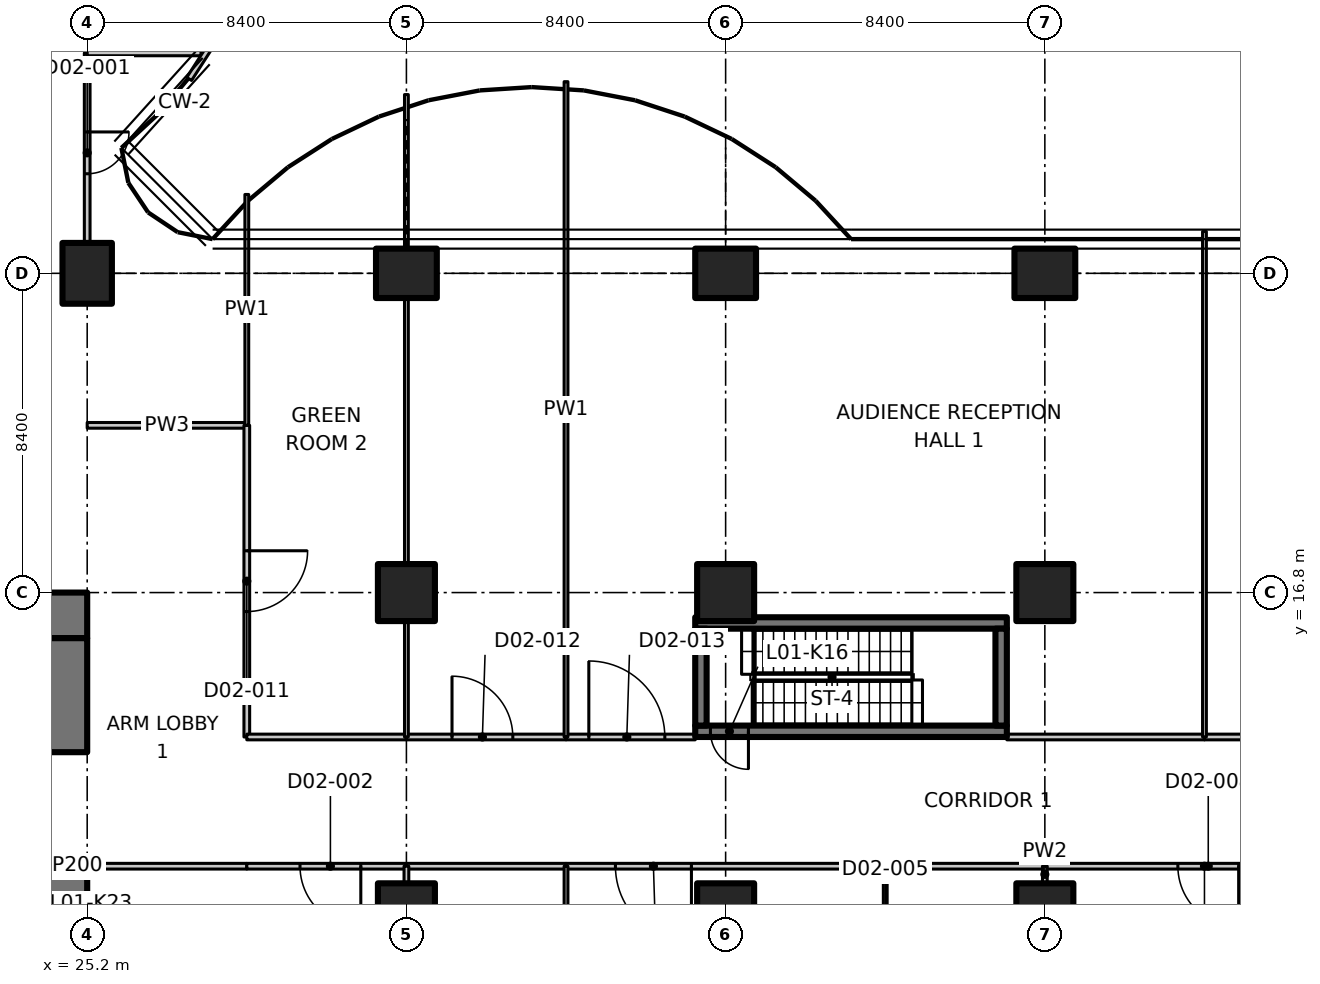
"""IFC4 building model, lengths in metres.
Left out: names, types, materials, properties, quantities, classifications, styles, units other than length and angle.
Written with IfcOpenShell. Run it as: python <this file> out.ifc"""

import sys

from ifc_helpers import new_model, si_unit, direction, frame, frame_2d, origin, origin_2d, place, context, subcontext, project, spatial, polyline, rectangle, outline, extrude, element, fill, save


model = new_model("IFC4")
c1 = context("Model", 3, precision=1e-05, world=origin(), true_north=direction((0.0, 1.0)))
c2 = subcontext(c1, "Body", "Model", "MODEL_VIEW")
j1 = project(units=[si_unit("LENGTHUNIT", "METRE"), si_unit("PLANEANGLEUNIT", "RADIAN")], contexts=[c1])
p1 = place(None, origin())
s1 = spatial("IfcSite", under=j1, at=p1, CompositionType="ELEMENT")
p2 = place(p1, origin())
s2 = spatial("IfcBuilding", under=s1, at=p2, CompositionType="ELEMENT")
p3 = place(p2, frame((0.0, 0.0, 7.0)))
s3 = spatial("IfcBuildingStorey", under=s2, at=p3, CompositionType="ELEMENT", Elevation=7.0)
p4 = place(p3, frame((25.2, 25.2, 0.0), z_axis=(0.0, 0.0, 1.0), x_axis=(1.0, 0.0, 0.0)))
e1 = element("IfcColumn", 1, at=p4, inside=s3, PredefinedType="COLUMN", context=c2, shape_type="SweptSolid", body=[
    extrude(rectangle(XDim=1.3, YDim=1.6, at=origin_2d()), origin(), (0.0, 0.0, 1.0), 5.25),
])
for number, where, z_axis, x_axis in (
    (2, (33.6, 8.4, 0.0), (0.0, 0.0, 1.0), (1.0, 0.0, 0.0)),
    (3, (33.6, 16.8, 0.0), (0.0, 0.0, 1.0), (1.0, 0.0, 0.0)),
):
    element("IfcColumn", number, at=place(p3, frame(where, z_axis=z_axis, x_axis=x_axis)), inside=s3, PredefinedType="COLUMN", context=c2, shape_type="SweptSolid", body=[
        extrude(rectangle(XDim=1.5, YDim=1.5, at=origin_2d()), origin(), (0.0, 0.0, 1.0), 5.25),
    ])
p5 = place(p3, frame((33.6, 25.2, 0.0), z_axis=(0.0, 0.0, 1.0), x_axis=(0.0, 1.0, 0.0)))
e4 = element("IfcColumn", 4, at=p5, inside=s3, PredefinedType="COLUMN", context=c2, shape_type="SweptSolid", body=[
    extrude(rectangle(XDim=1.3, YDim=1.6, at=origin_2d()), origin(), (0.0, 0.0, 1.0), 5.25),
])
for number, where, z_axis, x_axis in (
    (5, (42.0, 8.4, 0.0), (0.0, 0.0, 1.0), (1.0, 0.0, 0.0)),
    (6, (42.0, 16.8, 0.0), (0.0, 0.0, 1.0), (1.0, 0.0, 0.0)),
):
    element("IfcColumn", number, at=place(p3, frame(where, z_axis=z_axis, x_axis=x_axis)), inside=s3, PredefinedType="COLUMN", context=c2, shape_type="SweptSolid", body=[
        extrude(rectangle(XDim=1.5, YDim=1.5, at=origin_2d()), origin(), (0.0, 0.0, 1.0), 5.25),
    ])
p6 = place(p3, frame((42.0, 25.2, 0.0), z_axis=(0.0, 0.0, 1.0), x_axis=(0.0, 1.0, 0.0)))
e7 = element("IfcColumn", 7, at=p6, inside=s3, PredefinedType="COLUMN", context=c2, shape_type="SweptSolid", body=[
    extrude(rectangle(XDim=1.3, YDim=1.6, at=origin_2d()), origin(), (0.0, 0.0, 1.0), 5.25),
])
for number, where, z_axis, x_axis in (
    (8, (50.4, 8.4, 0.0), (0.0, 0.0, 1.0), (1.0, 0.0, 0.0)),
    (9, (50.4, 16.8, 0.0), (0.0, 0.0, 1.0), (1.0, 0.0, 0.0)),
):
    element("IfcColumn", number, at=place(p3, frame(where, z_axis=z_axis, x_axis=x_axis)), inside=s3, PredefinedType="COLUMN", context=c2, shape_type="SweptSolid", body=[
        extrude(rectangle(XDim=1.5, YDim=1.5, at=origin_2d()), origin(), (0.0, 0.0, 1.0), 5.25),
    ])
p7 = place(p3, frame((50.4, 25.2, 0.0), z_axis=(0.0, 0.0, 1.0), x_axis=(0.0, 1.0, 0.0)))
e10 = element("IfcColumn", 10, at=p7, inside=s3, PredefinedType="COLUMN", context=c2, shape_type="SweptSolid", body=[
    extrude(rectangle(XDim=1.3, YDim=1.6, at=origin_2d()), origin(), (0.0, 0.0, 1.0), 5.25),
])
p8 = place(p3, frame((23.8, 16.2, 0.0), z_axis=(0.0, 0.0, 1.0), x_axis=(1.0, 0.0, 0.0)))
e11 = element("IfcWall", 11, at=p8, inside=s3, PredefinedType="SHEAR", context=c2, shape_type="SweptSolid", body=[
    extrude(rectangle(XDim=1.4, YDim=1.2, at=frame_2d((0.7, 0.0))), origin(), (0.0, 0.0, 1.0), 5.25),
])
p9 = place(p3, frame((24.6, 1.2, 0.0), z_axis=(0.0, 0.0, 1.0), x_axis=(0.0, 1.0, 0.0)))
e12 = element("IfcWall", 12, at=p9, inside=s3, PredefinedType="SHEAR", context=c2, shape_type="SweptSolid", body=[
    extrude(rectangle(XDim=8.6, YDim=1.2, at=frame_2d((4.3, 0.0))), origin(), (0.0, 0.0, 1.0), 5.25),
])
p10 = place(p3, frame((24.6, 12.6, 0.0), z_axis=(0.0, 0.0, 1.0), x_axis=(0.0, 1.0, 0.0)))
e13 = element("IfcWall", 13, at=p10, inside=s3, PredefinedType="SHEAR", context=c2, shape_type="SweptSolid", body=[
    extrude(rectangle(XDim=3.0, YDim=1.2, at=frame_2d((1.5, 0.0))), origin(), (0.0, 0.0, 1.0), 5.25),
])
p11 = place(p3, frame((49.4, 13.15, 0.0), z_axis=(0.0, 0.0, 1.0), x_axis=(-1.0, 0.0, 0.0)))
e14 = element("IfcWall", 14, at=p11, inside=s3, PredefinedType="SHEAR", context=c2, shape_type="SweptSolid", body=[
    extrude(rectangle(XDim=8.2, YDim=0.3, at=frame_2d((4.1, 0.0))), origin(), (0.0, 0.0, 1.0), 5.25),
])
p12 = place(p11, frame((6.8, 0.0, 0.0)))
e15 = element("IfcOpeningElement", 15, at=p12, cuts=e14, PredefinedType="OPENING", context=c2, shape_type="SweptSolid", body=[
    extrude(rectangle(XDim=1.0, YDim=2.1, at=frame_2d((0.5, 1.05))), frame((0.0, 0.16, 0.0), z_axis=(0.0, -1.0, 0.0), x_axis=(1.0, 0.0, 0.0)), (0.0, 0.0, 1.0), 0.32),
])
p13 = place(p3, frame((41.2, 16.0, 0.0), z_axis=(0.0, 0.0, 1.0), x_axis=(1.0, 0.0, 0.0)))
e16 = element("IfcWall", 16, at=p13, inside=s3, PredefinedType="SHEAR", context=c2, shape_type="SweptSolid", body=[
    extrude(rectangle(XDim=8.2, YDim=0.3, at=frame_2d((4.1, 0.0))), origin(), (0.0, 0.0, 1.0), 5.25),
])
for number, where, z_axis, x_axis in (
    (17, (41.35, 13.3, 0.0), (0.0, 0.0, 1.0), (0.0, 1.0, 0.0)),
    (18, (49.25, 13.3, 0.0), (0.0, 0.0, 1.0), (0.0, 1.0, 0.0)),
):
    element("IfcWall", number, at=place(p3, frame(where, z_axis=z_axis, x_axis=x_axis)), inside=s3, PredefinedType="SHEAR", context=c2, shape_type="SweptSolid", body=[
        extrude(rectangle(XDim=2.55, YDim=0.3, at=frame_2d((1.275, 0.0))), origin(), (0.0, 0.0, 1.0), 5.25),
    ])
for number, where, z_axis, x_axis in (
    (19, (25.2, 21.2, 0.0), (0.0, 0.0, 1.0), (1.0, 0.0, 0.0)),
    (20, (29.4, 9.6, 0.0), (0.0, 0.0, 1.0), (-1.0, 0.0, 0.0)),
):
    element("IfcWall", number, at=place(p3, frame(where, z_axis=z_axis, x_axis=x_axis)), inside=s3, PredefinedType="PARTITIONING", context=c2, shape_type="SweptSolid", body=[
        extrude(rectangle(XDim=4.2, YDim=0.15, at=frame_2d((2.1, 0.0))), origin(), (0.0, 0.0, 1.0), 5.23),
    ])
p14 = place(p3, frame((29.4, 21.2, 0.0), z_axis=(0.0, 0.0, 1.0), x_axis=(0.0, -1.0, 0.0)))
e21 = element("IfcWall", 21, at=p14, inside=s3, PredefinedType="PARTITIONING", context=c2, shape_type="SweptSolid", body=[
    extrude(rectangle(XDim=8.2, YDim=0.15, at=frame_2d((4.1, 0.0))), origin(), (0.0, 0.0, 1.0), 5.23),
])
p15 = place(p14, frame((3.3, 0.0, 0.0)))
e22 = element("IfcOpeningElement", 22, at=p15, cuts=e21, PredefinedType="OPENING", context=c2, shape_type="SweptSolid", body=[
    extrude(rectangle(XDim=1.6, YDim=2.1, at=frame_2d((0.8, 1.05))), frame((0.0, 0.085, 0.0), z_axis=(0.0, -1.0, 0.0), x_axis=(1.0, 0.0, 0.0)), (0.0, 0.0, 1.0), 0.17),
])
p16 = place(p3, frame((29.4, 27.275, 0.0), z_axis=(0.0, 0.0, 1.0), x_axis=(0.0, -1.0, 0.0)))
e23 = element("IfcWall", 23, at=p16, inside=s3, PredefinedType="PARTITIONING", context=c2, shape_type="SweptSolid", body=[
    extrude(outline(polyline([(0.0, 0.0), (6.075, 0.0), (6.075, 5.23), (2.525, 5.23), (2.523, 4.88), (1.627, 4.88), (1.625, 5.23), (0.0, 5.23), (0.0, 0.0)])), frame((0.0, 0.05, 0.0), z_axis=(0.0, -1.0, 0.0), x_axis=(1.0, 0.0, 0.0)), (0.0, 0.0, 1.0), 0.1),
])
p17 = place(p3, frame((25.2, 31.0, 0.0), z_axis=(0.0, 0.0, 1.0), x_axis=(0.0, -1.0, 0.0)))
e24 = element("IfcWall", 24, at=p17, inside=s3, PredefinedType="PARTITIONING", context=c2, shape_type="SweptSolid", body=[
    extrude(rectangle(XDim=4.98, YDim=0.15, at=frame_2d((2.49, 0.0))), origin(), (0.0, 0.0, 1.0), 5.23),
])
p18 = place(p17, frame((2.08, 0.0, 0.0)))
e25 = element("IfcOpeningElement", 25, at=p18, cuts=e24, PredefinedType="OPENING", context=c2, shape_type="SweptSolid", body=[
    extrude(rectangle(XDim=1.1, YDim=2.1, at=frame_2d((0.55, 1.05))), frame((0.0, 0.085, 0.0), z_axis=(0.0, -1.0, 0.0), x_axis=(1.0, 0.0, 0.0)), (0.0, 0.0, 1.0), 0.17),
])
p19 = place(p3, frame((25.2, 31.0, 0.0), z_axis=(0.0, 0.0, 1.0), x_axis=(1.0, 0.0, 0.0)))
e26 = element("IfcWall", 26, at=p19, inside=s3, PredefinedType="PARTITIONING", context=c2, shape_type="SweptSolid", body=[
    extrude(rectangle(XDim=2.994, YDim=0.15, at=frame_2d((1.497, 0.0))), origin(), (0.0, 0.0, 1.0), 5.23),
])
p20 = place(p3, frame((28.432, 31.168, 0.0), z_axis=(0.0, 0.0, 1.0), x_axis=(-0.540854867502, -0.841115932734, 0.0)))
e27 = element("IfcWall", 27, at=p20, inside=s3, PredefinedType="PARTITIONING", context=c2, shape_type="SweptSolid", body=[
    extrude(rectangle(XDim=1.015, YDim=0.15, at=frame_2d((0.507, 0.0))), origin(), (0.0, 0.0, 1.0), 5.23),
])
p21 = place(p3, frame((33.6, 9.6, 0.0), z_axis=(0.0, 0.0, 1.0), x_axis=(-1.0, 0.0, 0.0)))
e28 = element("IfcWall", 28, at=p21, inside=s3, PredefinedType="PARTITIONING", context=c2, shape_type="SweptSolid", body=[
    extrude(rectangle(XDim=4.2, YDim=0.15, at=frame_2d((2.1, 0.0))), origin(), (0.0, 0.0, 1.0), 5.23),
])
p22 = place(p21, frame((1.2, 0.0, 0.0)))
e29 = element("IfcOpeningElement", 29, at=p22, cuts=e28, PredefinedType="OPENING", context=c2, shape_type="SweptSolid", body=[
    extrude(rectangle(XDim=1.6, YDim=2.1, at=frame_2d((0.8, 1.05))), frame((0.0, 0.085, 0.0), z_axis=(0.0, -1.0, 0.0), x_axis=(1.0, 0.0, 0.0)), (0.0, 0.0, 1.0), 0.17),
])
p23 = place(p3, frame((46.2, 9.6, 0.0), z_axis=(0.0, 0.0, 1.0), x_axis=(-1.0, 0.0, 0.0)))
e30 = element("IfcWall", 30, at=p23, inside=s3, PredefinedType="PARTITIONING", context=c2, shape_type="SweptSolid", body=[
    extrude(rectangle(XDim=8.4, YDim=0.15, at=frame_2d((4.2, 0.0))), origin(), (0.0, 0.0, 1.0), 5.23),
])
p24 = place(p23, frame((5.1, 0.0, 0.0)))
e31 = element("IfcOpeningElement", 31, at=p24, cuts=e30, PredefinedType="OPENING", context=c2, shape_type="SweptSolid", body=[
    extrude(rectangle(XDim=2.0, YDim=2.4, at=frame_2d((1.0, 1.2))), frame((0.0, 0.085, 0.0), z_axis=(0.0, -1.0, 0.0), x_axis=(1.0, 0.0, 0.0)), (0.0, 0.0, 1.0), 0.17),
])
for number, where, z_axis, x_axis in (
    (32, (50.4, 9.6, 0.0), (0.0, 0.0, 1.0), (-1.0, 0.0, 0.0)),
    (33, (37.8, 9.6, 0.0), (0.0, 0.0, 1.0), (-1.0, 0.0, 0.0)),
):
    element("IfcWall", number, at=place(p3, frame(where, z_axis=z_axis, x_axis=x_axis)), inside=s3, PredefinedType="PARTITIONING", context=c2, shape_type="SweptSolid", body=[
        extrude(rectangle(XDim=4.2, YDim=0.15, at=frame_2d((2.1, 0.0))), origin(), (0.0, 0.0, 1.0), 5.23),
    ])
p25 = place(p3, frame((58.8, 9.6, 0.0), z_axis=(0.0, 0.0, 1.0), x_axis=(-1.0, 0.0, 0.0)))
e34 = element("IfcWall", 34, at=p25, inside=s3, PredefinedType="PARTITIONING", context=c2, shape_type="SweptSolid", body=[
    extrude(rectangle(XDim=8.4, YDim=0.15, at=frame_2d((4.2, 0.0))), origin(), (0.0, 0.0, 1.0), 5.23),
])
p26 = place(p25, frame((3.3, 0.0, 0.0)))
e35 = element("IfcOpeningElement", 35, at=p26, cuts=e34, PredefinedType="OPENING", context=c2, shape_type="SweptSolid", body=[
    extrude(rectangle(XDim=1.6, YDim=2.1, at=frame_2d((0.8, 1.05))), frame((0.0, 0.085, 0.0), z_axis=(0.0, -1.0, 0.0), x_axis=(1.0, 0.0, 0.0)), (0.0, 0.0, 1.0), 0.17),
])
p27 = place(p3, frame((29.4, 13.0, 0.0), z_axis=(0.0, 0.0, 1.0), x_axis=(1.0, 0.0, 0.0)))
e36 = element("IfcWall", 36, at=p27, inside=s3, PredefinedType="PARTITIONING", context=c2, shape_type="SweptSolid", body=[
    extrude(rectangle(XDim=4.2, YDim=0.15, at=frame_2d((2.1, 0.0))), origin(), (0.0, 0.0, 1.0), 5.23),
])
p28 = place(p3, frame((33.6, 13.0, 0.0), z_axis=(0.0, 0.0, 1.0), x_axis=(1.0, 0.0, 0.0)))
e37 = element("IfcWall", 37, at=p28, inside=s3, PredefinedType="PARTITIONING", context=c2, shape_type="SweptSolid", body=[
    extrude(rectangle(XDim=4.2, YDim=0.15, at=frame_2d((2.1, 0.0))), origin(), (0.0, 0.0, 1.0), 5.23),
])
p29 = place(p28, frame((1.2, 0.0, 0.0)))
e38 = element("IfcOpeningElement", 38, at=p29, cuts=e37, PredefinedType="OPENING", context=c2, shape_type="SweptSolid", body=[
    extrude(rectangle(XDim=1.6, YDim=2.1, at=frame_2d((0.8, 1.05))), frame((0.0, 0.085, 0.0), z_axis=(0.0, -1.0, 0.0), x_axis=(1.0, 0.0, 0.0)), (0.0, 0.0, 1.0), 0.17),
])
p30 = place(p3, frame((37.8, 13.0, 0.0), z_axis=(0.0, 0.0, 1.0), x_axis=(1.0, 0.0, 0.0)))
e39 = element("IfcWall", 39, at=p30, inside=s3, PredefinedType="PARTITIONING", context=c2, shape_type="SweptSolid", body=[
    extrude(rectangle(XDim=3.4, YDim=0.15, at=frame_2d((1.7, 0.0))), origin(), (0.0, 0.0, 1.0), 5.23),
])
p31 = place(p30, frame((0.6, 0.0, 0.0)))
e40 = element("IfcOpeningElement", 40, at=p31, cuts=e39, PredefinedType="OPENING", context=c2, shape_type="SweptSolid", body=[
    extrude(rectangle(XDim=2.0, YDim=2.4, at=frame_2d((1.0, 1.2))), frame((0.0, 0.085, 0.0), z_axis=(0.0, -1.0, 0.0), x_axis=(1.0, 0.0, 0.0)), (0.0, 0.0, 1.0), 0.17),
])
p32 = place(p3, frame((49.4, 13.0, 0.0), z_axis=(0.0, 0.0, 1.0), x_axis=(1.0, 0.0, 0.0)))
e41 = element("IfcWall", 41, at=p32, inside=s3, PredefinedType="PARTITIONING", context=c2, shape_type="SweptSolid", body=[
    extrude(rectangle(XDim=5.2, YDim=0.15, at=frame_2d((2.6, 0.0))), origin(), (0.0, 0.0, 1.0), 5.23),
])
p33 = place(p3, frame((54.6, 13.0, 0.0), z_axis=(0.0, 0.0, 1.0), x_axis=(1.0, 0.0, 0.0)))
e42 = element("IfcWall", 42, at=p33, inside=s3, PredefinedType="PARTITIONING", context=c2, shape_type="SweptSolid", body=[
    extrude(rectangle(XDim=8.4, YDim=0.15, at=frame_2d((4.2, 0.0))), origin(), (0.0, 0.0, 1.0), 5.23),
])
p34 = place(p33, frame((3.3, 0.0, 0.0)))
e43 = element("IfcOpeningElement", 43, at=p34, cuts=e42, PredefinedType="OPENING", context=c2, shape_type="SweptSolid", body=[
    extrude(rectangle(XDim=1.6, YDim=2.1, at=frame_2d((0.8, 1.05))), frame((0.0, 0.085, 0.0), z_axis=(0.0, -1.0, 0.0), x_axis=(1.0, 0.0, 0.0)), (0.0, 0.0, 1.0), 0.17),
])
p35 = place(p3, frame((33.6, 9.6, 0.0), z_axis=(0.0, 0.0, 1.0), x_axis=(0.0, -1.0, 0.0)))
e44 = element("IfcWall", 44, at=p35, inside=s3, PredefinedType="PARTITIONING", context=c2, shape_type="SweptSolid", body=[
    extrude(rectangle(XDim=0.43, YDim=0.125, at=frame_2d((0.215, 0.0))), origin(), (0.0, 0.0, 1.0), 5.23),
])
p36 = place(p3, frame((46.2, 9.6, 0.0), z_axis=(0.0, 0.0, 1.0), x_axis=(0.0, -1.0, 0.0)))
e45 = element("IfcWall", 45, at=p36, inside=s3, PredefinedType="PARTITIONING", context=c2, shape_type="SweptSolid", body=[
    extrude(rectangle(XDim=4.8, YDim=0.1, at=frame_2d((2.4, 0.0))), origin(), (0.0, 0.0, 1.0), 5.23),
])
p37 = place(p36, frame((1.8, 0.0, 0.0)))
e46 = element("IfcOpeningElement", 46, at=p37, cuts=e45, PredefinedType="OPENING", context=c2, shape_type="SweptSolid", body=[
    extrude(rectangle(XDim=1.0, YDim=2.1, at=frame_2d((0.5, 1.05))), frame((0.0, 0.06, 0.0), z_axis=(0.0, -1.0, 0.0), x_axis=(1.0, 0.0, 0.0)), (0.0, 0.0, 1.0), 0.12),
])
p38 = place(p3, frame((37.8, 3.6, 0.0), z_axis=(0.0, 0.0, 1.0), x_axis=(0.0, 1.0, 0.0)))
e47 = element("IfcWall", 47, at=p38, inside=s3, PredefinedType="PARTITIONING", context=c2, shape_type="SweptSolid", body=[
    extrude(rectangle(XDim=6.0, YDim=0.1, at=frame_2d((3.0, 0.0))), origin(), (0.0, 0.0, 1.0), 5.23),
])
p39 = place(p38, frame((2.4, 0.0, 0.0)))
e48 = element("IfcOpeningElement", 48, at=p39, cuts=e47, PredefinedType="OPENING", context=c2, shape_type="SweptSolid", body=[
    extrude(rectangle(XDim=1.0, YDim=2.1, at=frame_2d((0.5, 1.05))), frame((0.0, 0.06, 0.0), z_axis=(0.0, -1.0, 0.0), x_axis=(1.0, 0.0, 0.0)), (0.0, 0.0, 1.0), 0.12),
])
p40 = place(p3, frame((50.4, 9.6, 0.0), z_axis=(0.0, 0.0, 1.0), x_axis=(0.0, -1.0, 0.0)))
e49 = element("IfcWall", 49, at=p40, inside=s3, PredefinedType="PARTITIONING", context=c2, shape_type="SweptSolid", body=[
    extrude(rectangle(XDim=0.43, YDim=0.125, at=frame_2d((0.215, 0.0))), origin(), (0.0, 0.0, 1.0), 5.23),
])
p41 = place(p3, frame((33.6, 29.904, 0.0), z_axis=(0.0, 0.0, 1.0), x_axis=(0.0, -1.0, 0.0)))
e50 = element("IfcWall", 50, at=p41, inside=s3, PredefinedType="PARTITIONING", context=c2, shape_type="SweptSolid", body=[
    extrude(rectangle(XDim=4.033, YDim=0.1, at=frame_2d((2.017, 0.0))), origin(), (0.0, 0.0, 1.0), 4.88),
])
p42 = place(p3, frame((33.6, 24.53, 0.0), z_axis=(0.0, 0.0, 1.0), x_axis=(0.0, -1.0, 0.0)))
e51 = element("IfcWall", 51, at=p42, inside=s3, PredefinedType="PARTITIONING", context=c2, shape_type="SweptSolid", body=[
    extrude(rectangle(XDim=6.96, YDim=0.1, at=frame_2d((3.48, 0.0))), origin(), (0.0, 0.0, 1.0), 5.23),
])
p43 = place(p3, frame((33.6, 16.03, 0.0), z_axis=(0.0, 0.0, 1.0), x_axis=(0.0, -1.0, 0.0)))
e52 = element("IfcWall", 52, at=p43, inside=s3, PredefinedType="PARTITIONING", context=c2, shape_type="SweptSolid", body=[
    extrude(rectangle(XDim=3.03, YDim=0.1, at=frame_2d((1.515, 0.0))), origin(), (0.0, 0.0, 1.0), 5.23),
])
p44 = place(p3, frame((37.8, 30.243, 0.0), z_axis=(0.0, 0.0, 1.0), x_axis=(0.0, -1.0, 0.0)))
e53 = element("IfcWall", 53, at=p44, inside=s3, PredefinedType="PARTITIONING", context=c2, shape_type="SweptSolid", body=[
    extrude(outline(polyline([(0.0, 0.0), (17.243, 0.0), (17.243, 5.23), (5.493, 5.23), (5.491, 4.88), (4.595, 4.88), (4.593, 5.23), (0.0, 5.23), (0.0, 0.0)])), frame((0.0, 0.05, 0.0), z_axis=(0.0, -1.0, 0.0), x_axis=(1.0, 0.0, 0.0)), (0.0, 0.0, 1.0), 0.1),
])
p45 = place(p3, frame((54.6, 26.3, 0.0), z_axis=(0.0, 0.0, 1.0), x_axis=(0.0, -1.0, 0.0)))
e54 = element("IfcWall", 54, at=p45, inside=s3, PredefinedType="PARTITIONING", context=c2, shape_type="SweptSolid", body=[
    extrude(outline(polyline([(0.0, 0.0), (13.3, 0.0), (13.3, 5.23), (1.55, 5.23), (1.548, 4.88), (0.652, 4.88), (0.65, 5.23), (0.0, 5.23), (0.0, 0.0)])), frame((0.0, 0.05, 0.0), z_axis=(0.0, -1.0, 0.0), x_axis=(1.0, 0.0, 0.0)), (0.0, 0.0, 1.0), 0.1),
])
p46 = place(p12, origin())
e55 = element("IfcDoor", 55, at=p46, inside=s3, OperationType="SINGLE_SWING_RIGHT", PredefinedType="DOOR", context=c2, shape_type="SweptSolid", body=[
    extrude(rectangle(XDim=1.0, YDim=2.1, at=frame_2d((0.5, 1.05))), frame((0.0, 0.025, 0.0), z_axis=(0.0, -1.0, 0.0), x_axis=(1.0, 0.0, 0.0)), (0.0, 0.0, 1.0), 0.05),
])
fill(e15, e55)
p47 = place(p18, origin())
e56 = element("IfcDoor", 56, at=p47, inside=s3, OperationType="SINGLE_SWING_RIGHT", PredefinedType="DOOR", context=c2, shape_type="SweptSolid", body=[
    extrude(rectangle(XDim=1.1, YDim=2.1, at=frame_2d((0.55, 1.05))), frame((0.0, 0.025, 0.0), z_axis=(0.0, -1.0, 0.0), x_axis=(1.0, 0.0, 0.0)), (0.0, 0.0, 1.0), 0.05),
])
fill(e25, e56)
p48 = place(p22, origin())
e57 = element("IfcDoor", 57, at=p48, inside=s3, OperationType="DOUBLE_DOOR_SINGLE_SWING", PredefinedType="DOOR", context=c2, shape_type="SweptSolid", body=[
    extrude(rectangle(XDim=1.6, YDim=2.1, at=frame_2d((0.8, 1.05))), frame((0.0, 0.025, 0.0), z_axis=(0.0, -1.0, 0.0), x_axis=(1.0, 0.0, 0.0)), (0.0, 0.0, 1.0), 0.05),
])
fill(e29, e57)
p49 = place(p24, origin())
e58 = element("IfcDoor", 58, at=p49, inside=s3, OperationType="DOUBLE_DOOR_SINGLE_SWING", PredefinedType="DOOR", context=c2, shape_type="SweptSolid", body=[
    extrude(rectangle(XDim=2.0, YDim=2.4, at=frame_2d((1.0, 1.2))), frame((0.0, 0.025, 0.0), z_axis=(0.0, -1.0, 0.0), x_axis=(1.0, 0.0, 0.0)), (0.0, 0.0, 1.0), 0.05),
])
fill(e31, e58)
p50 = place(p26, origin())
e59 = element("IfcDoor", 59, at=p50, inside=s3, OperationType="DOUBLE_DOOR_SINGLE_SWING", PredefinedType="DOOR", context=c2, shape_type="SweptSolid", body=[
    extrude(rectangle(XDim=1.6, YDim=2.1, at=frame_2d((0.8, 1.05))), frame((0.0, 0.025, 0.0), z_axis=(0.0, -1.0, 0.0), x_axis=(1.0, 0.0, 0.0)), (0.0, 0.0, 1.0), 0.05),
])
fill(e35, e59)
p51 = place(p15, origin())
e60 = element("IfcDoor", 60, at=p51, inside=s3, OperationType="DOUBLE_DOOR_SINGLE_SWING", PredefinedType="DOOR", context=c2, shape_type="SweptSolid", body=[
    extrude(rectangle(XDim=1.6, YDim=2.1, at=frame_2d((0.8, 1.05))), frame((0.0, 0.025, 0.0), z_axis=(0.0, -1.0, 0.0), x_axis=(1.0, 0.0, 0.0)), (0.0, 0.0, 1.0), 0.05),
])
fill(e22, e60)
p52 = place(p29, origin())
e61 = element("IfcDoor", 61, at=p52, inside=s3, OperationType="DOUBLE_DOOR_SINGLE_SWING", PredefinedType="DOOR", context=c2, shape_type="SweptSolid", body=[
    extrude(rectangle(XDim=1.6, YDim=2.1, at=frame_2d((0.8, 1.05))), frame((0.0, 0.025, 0.0), z_axis=(0.0, -1.0, 0.0), x_axis=(1.0, 0.0, 0.0)), (0.0, 0.0, 1.0), 0.05),
])
fill(e38, e61)
p53 = place(p31, origin())
e62 = element("IfcDoor", 62, at=p53, inside=s3, OperationType="DOUBLE_DOOR_SINGLE_SWING", PredefinedType="DOOR", context=c2, shape_type="SweptSolid", body=[
    extrude(rectangle(XDim=2.0, YDim=2.4, at=frame_2d((1.0, 1.2))), frame((0.0, 0.025, 0.0), z_axis=(0.0, -1.0, 0.0), x_axis=(1.0, 0.0, 0.0)), (0.0, 0.0, 1.0), 0.05),
])
fill(e40, e62)
save(model, sys.argv[1])
